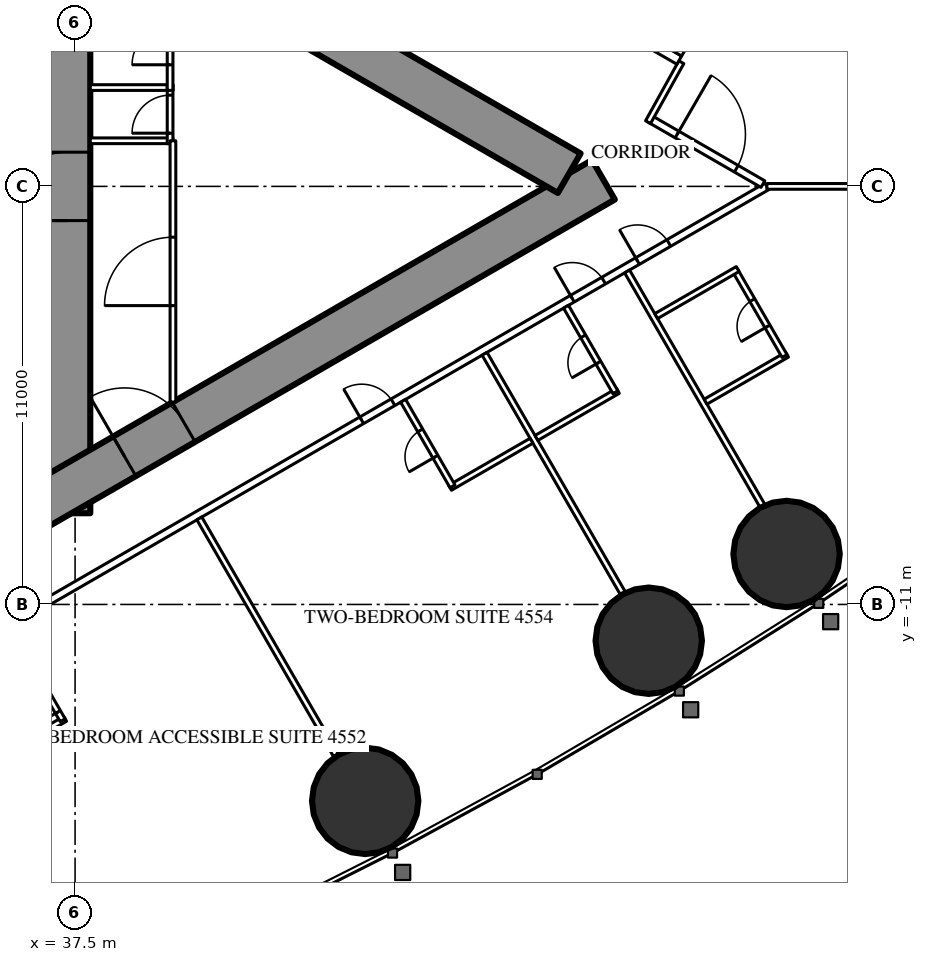
"""IFC4 building model, lengths in metres.
Left out: names, types, materials, properties, quantities, classifications, styles, units other than length and angle.
Written with IfcOpenShell. Run it as: python <this file> out.ifc"""

import sys

from ifc_helpers import new_model, si_unit, direction, frame, frame_2d, origin, origin_2d, place, context, subcontext, project, spatial, rectangle, circle, extrude, element, fill, save


model = new_model("IFC4")
c1 = context("Model", 3, precision=1e-05, world=origin(), true_north=direction((0.0, 1.0)))
c2 = subcontext(c1, "Body", "Model", "MODEL_VIEW")
j1 = project(units=[si_unit("LENGTHUNIT", "METRE"), si_unit("PLANEANGLEUNIT", "RADIAN")], contexts=[c1])
p1 = place(None, origin())
s1 = spatial("IfcSite", under=j1, at=p1, CompositionType="ELEMENT")
p2 = place(p1, origin())
s2 = spatial("IfcBuilding", under=s1, at=p2, CompositionType="ELEMENT")
p3 = place(p2, frame((0.0, 0.0, 170.3)))
s3 = spatial("IfcBuildingStorey", under=s2, at=p3, CompositionType="ELEMENT", Elevation=170.3)
for number, where, z_axis, x_axis in (
    (1, (45.134, -16.168, 0.0), (0.0, 0.0, 1.0), (1.0, 0.0, 0.0)),
    (2, (52.594, -11.955, 0.0), (0.0, 0.0, 1.0), (1.0, 0.0, 0.0)),
    (3, (56.221, -9.672, 0.0), (0.0, 0.0, 1.0), (1.0, 0.0, 0.0)),
):
    element("IfcColumn", number, at=place(p3, frame(where, z_axis=z_axis, x_axis=x_axis)), inside=s3, PredefinedType="COLUMN", context=c2, shape_type="SweptSolid", body=[
        extrude(circle(Radius=1.4, at=origin_2d()), origin(), (0.0, 0.0, 1.0), 3.5),
    ])
p4 = place(p3, frame((37.3, -8.6, 0.0), z_axis=(0.0, 0.0, 1.0), x_axis=(0.0, 1.0, 0.0)))
e4 = element("IfcWall", 4, at=p4, inside=s3, PredefinedType="SHEAR", context=c2, shape_type="SweptSolid", body=[
    extrude(rectangle(XDim=17.2, YDim=1.2, at=frame_2d((8.6, 0.0))), origin(), (0.0, 0.0, 1.0), 3.5),
])
p5 = place(p4, frame((7.7, 0.0, 0.0)))
e5 = element("IfcOpeningElement", 5, at=p5, cuts=e4, PredefinedType="OPENING", context=c2, shape_type="SweptSolid", body=[
    extrude(rectangle(XDim=1.8, YDim=2.2, at=frame_2d((0.9, 1.1))), frame((0.0, 0.61, 0.0), z_axis=(0.0, -1.0, 0.0), x_axis=(1.0, 0.0, 0.0)), (0.0, 0.0, 1.0), 1.22),
])
p6 = place(p3, frame((27.2, -13.8, 0.0), z_axis=(0.0, 0.0, 1.0), x_axis=(0.866027159892, 0.499996958321, 0.0)))
e6 = element("IfcWall", 6, at=p6, inside=s3, PredefinedType="SHEAR", context=c2, shape_type="SweptSolid", body=[
    extrude(rectangle(XDim=27.947, YDim=1.2, at=frame_2d((13.973, 0.0))), origin(), (0.0, 0.0, 1.0), 3.5),
])
p7 = place(p6, frame((4.6, 0.0, 0.0)))
e7 = element("IfcOpeningElement", 7, at=p7, cuts=e6, PredefinedType="OPENING", context=c2, shape_type="SweptSolid", body=[
    extrude(rectangle(XDim=1.0, YDim=2.2, at=frame_2d((0.5, 1.1))), frame((0.0, 0.61, 0.0), z_axis=(0.0, -1.0, 0.0), x_axis=(1.0, 0.0, 0.0)), (0.0, 0.0, 1.0), 1.22),
])
p8 = place(p6, frame((13.395, 0.0, 0.0)))
e8 = element("IfcOpeningElement", 8, at=p8, cuts=e6, PredefinedType="OPENING", context=c2, shape_type="SweptSolid", body=[
    extrude(rectangle(XDim=1.8, YDim=2.2, at=frame_2d((0.9, 1.1))), frame((0.0, 0.61, 0.0), z_axis=(0.0, -1.0, 0.0), x_axis=(1.0, 0.0, 0.0)), (0.0, 0.0, 1.0), 1.22),
])
p9 = place(p3, frame((27.2, 13.8, 0.0), z_axis=(0.0, 0.0, 1.0), x_axis=(0.866024515034, -0.500001539357, 0.0)))
e9 = element("IfcWall", 9, at=p9, inside=s3, PredefinedType="SHEAR", context=c2, shape_type="SweptSolid", body=[
    extrude(rectangle(XDim=26.907, YDim=1.2, at=frame_2d((13.454, 0.0))), origin(), (0.0, 0.0, 1.0), 3.5),
])
p10 = place(p9, frame((4.6, 0.0, 0.0)))
e10 = element("IfcOpeningElement", 10, at=p10, cuts=e9, PredefinedType="OPENING", context=c2, shape_type="SweptSolid", body=[
    extrude(rectangle(XDim=1.0, YDim=2.2, at=frame_2d((0.5, 1.1))), frame((0.0, 0.61, 0.0), z_axis=(0.0, -1.0, 0.0), x_axis=(1.0, 0.0, 0.0)), (0.0, 0.0, 1.0), 1.22),
])
p11 = place(p9, frame((13.395, 0.0, 0.0)))
e11 = element("IfcOpeningElement", 11, at=p11, cuts=e9, PredefinedType="OPENING", context=c2, shape_type="SweptSolid", body=[
    extrude(rectangle(XDim=1.8, YDim=2.2, at=frame_2d((0.9, 1.1))), frame((0.0, 0.61, 0.0), z_axis=(0.0, -1.0, 0.0), x_axis=(1.0, 0.0, 0.0)), (0.0, 0.0, 1.0), 1.22),
])
p12 = place(p3, frame((27.959, -16.017, 0.0), z_axis=(0.0, 0.0, 1.0), x_axis=(0.866024151371, 0.500002169237, 0.0)))
e12 = element("IfcWall", 12, at=p12, inside=s3, PredefinedType="PARTITIONING", context=c2, shape_type="SweptSolid", body=[
    extrude(rectangle(XDim=32.034, YDim=0.2, at=frame_2d((16.017, 0.0))), origin(), (0.0, 0.0, 1.0), 3.25),
])
p13 = place(p12, frame((4.765, 0.0, 0.0)))
e13 = element("IfcOpeningElement", 13, at=p13, cuts=e12, PredefinedType="OPENING", context=c2, shape_type="SweptSolid", body=[
    extrude(rectangle(XDim=0.95, YDim=2.2, at=frame_2d((0.475, 1.1))), frame((0.0, 0.11, 0.0), z_axis=(0.0, -1.0, 0.0), x_axis=(1.0, 0.0, 0.0)), (0.0, 0.0, 1.0), 0.22),
])
p14 = place(p12, frame((9.215, 0.0, 0.0)))
e14 = element("IfcOpeningElement", 14, at=p14, cuts=e12, PredefinedType="OPENING", context=c2, shape_type="SweptSolid", body=[
    extrude(rectangle(XDim=1.0, YDim=2.2, at=frame_2d((0.5, 1.1))), frame((0.0, 0.11, 0.0), z_axis=(0.0, -1.0, 0.0), x_axis=(1.0, 0.0, 0.0)), (0.0, 0.0, 1.0), 0.22),
])
p15 = place(p12, frame((19.725, 0.0, 0.0)))
e15 = element("IfcOpeningElement", 15, at=p15, cuts=e12, PredefinedType="OPENING", context=c2, shape_type="SweptSolid", body=[
    extrude(rectangle(XDim=0.95, YDim=2.2, at=frame_2d((0.475, 1.1))), frame((0.0, 0.11, 0.0), z_axis=(0.0, -1.0, 0.0), x_axis=(1.0, 0.0, 0.0)), (0.0, 0.0, 1.0), 0.22),
])
p16 = place(p12, frame((26.125, 0.0, 0.0)))
e16 = element("IfcOpeningElement", 16, at=p16, cuts=e12, PredefinedType="OPENING", context=c2, shape_type="SweptSolid", body=[
    extrude(rectangle(XDim=0.95, YDim=2.2, at=frame_2d((0.475, 1.1))), frame((0.0, 0.11, 0.0), z_axis=(0.0, -1.0, 0.0), x_axis=(1.0, 0.0, 0.0)), (0.0, 0.0, 1.0), 0.22),
])
p17 = place(p12, frame((28.106, 0.0, 0.0)))
e17 = element("IfcOpeningElement", 17, at=p17, cuts=e12, PredefinedType="OPENING", context=c2, shape_type="SweptSolid", body=[
    extrude(rectangle(XDim=0.95, YDim=2.2, at=frame_2d((0.475, 1.1))), frame((0.0, 0.11, 0.0), z_axis=(0.0, -1.0, 0.0), x_axis=(1.0, 0.0, 0.0)), (0.0, 0.0, 1.0), 0.22),
])
p18 = place(p3, frame((33.284, -13.059, 0.0), z_axis=(0.0, 0.0, 1.0), x_axis=(0.499985904184, -0.866033541855, 0.0)))
e18 = element("IfcWall", 18, at=p18, inside=s3, PredefinedType="PARTITIONING", context=c2, shape_type="SweptSolid", body=[
    extrude(rectangle(XDim=9.385, YDim=0.15, at=frame_2d((4.693, 0.0))), origin(), (0.0, 0.0, 1.0), 3.25),
])
p19 = place(p3, frame((40.769, -8.737, 0.0), z_axis=(0.0, 0.0, 1.0), x_axis=(0.500013115284, -0.866017831539, 0.0)))
e19 = element("IfcWall", 19, at=p19, inside=s3, PredefinedType="PARTITIONING", context=c2, shape_type="SweptSolid", body=[
    extrude(rectangle(XDim=7.198, YDim=0.15, at=frame_2d((3.599, 0.0))), origin(), (0.0, 0.0, 1.0), 2.3),
])
p20 = place(p3, frame((48.275, -4.404, 0.0), z_axis=(0.0, 0.0, 1.0), x_axis=(0.500006004368, -0.866021937133, 0.0)))
e20 = element("IfcWall", 20, at=p20, inside=s3, PredefinedType="PARTITIONING", context=c2, shape_type="SweptSolid", body=[
    extrude(rectangle(XDim=7.279, YDim=0.15, at=frame_2d((3.64, 0.0))), origin(), (0.0, 0.0, 1.0), 2.3),
])
p21 = place(p3, frame((52.025, -2.238, 0.0), z_axis=(0.0, 0.0, 1.0), x_axis=(0.499983785035, -0.866034765296, 0.0)))
e21 = element("IfcWall", 21, at=p21, inside=s3, PredefinedType="PARTITIONING", context=c2, shape_type="SweptSolid", body=[
    extrude(rectangle(XDim=7.116, YDim=0.15, at=frame_2d((3.558, 0.0))), origin(), (0.0, 0.0, 1.0), 2.3),
])
p22 = place(p3, frame((55.702, 0.0, 0.0), z_axis=(0.0, 0.0, 1.0), x_axis=(1.0, 0.0, 0.0)))
e22 = element("IfcWall", 22, at=p22, inside=s3, PredefinedType="PARTITIONING", context=c2, shape_type="SweptSolid", body=[
    extrude(rectangle(XDim=8.518, YDim=0.15, at=frame_2d((4.259, 0.0))), origin(), (0.0, 0.0, 1.0), 2.3),
])
p23 = place(p3, frame((52.639, 1.769, 0.0), z_axis=(0.0, 0.0, 1.0), x_axis=(0.866027340901, -0.4999966448, 0.0)))
e23 = element("IfcWall", 23, at=p23, inside=s3, PredefinedType="PARTITIONING", context=c2, shape_type="SweptSolid", body=[
    extrude(rectangle(XDim=3.417, YDim=0.2, at=frame_2d((1.708, 0.0))), origin(), (0.0, 0.0, 1.0), 3.25),
])
p24 = place(p23, frame((0.809, 0.0, 0.0)))
e24 = element("IfcOpeningElement", 24, at=p24, cuts=e23, PredefinedType="OPENING", context=c2, shape_type="SweptSolid", body=[
    extrude(rectangle(XDim=1.8, YDim=2.2, at=frame_2d((0.9, 1.1))), frame((0.0, 0.11, 0.0), z_axis=(0.0, -1.0, 0.0), x_axis=(1.0, 0.0, 0.0)), (0.0, 0.0, 1.0), 0.22),
])
p25 = place(p3, frame((52.576, 1.689, 0.0), z_axis=(0.0, 0.0, 1.0), x_axis=(0.485424724123, 0.874278466629, 0.0)))
e25 = element("IfcWall", 25, at=p25, inside=s3, PredefinedType="PARTITIONING", context=c2, shape_type="SweptSolid", body=[
    extrude(rectangle(XDim=1.805, YDim=0.15, at=frame_2d((0.903, 0.0))), origin(), (0.0, 0.0, 1.0), 3.25),
])
p26 = place(p3, frame((34.749, -15.446, 0.0), z_axis=(0.0, 0.0, 1.0), x_axis=(0.866018712932, 0.500011588718, 0.0)))
e26 = element("IfcWall", 26, at=p26, inside=s3, PredefinedType="PARTITIONING", context=c2, shape_type="SweptSolid", body=[
    extrude(rectangle(XDim=2.875, YDim=0.15, at=frame_2d((1.438, 0.0))), origin(), (0.0, 0.0, 1.0), 3.25),
])
p27 = place(p3, frame((35.773, -11.621, 0.0), z_axis=(0.0, 0.0, 1.0), x_axis=(0.49998411664, -0.866034573852, 0.0)))
e27 = element("IfcWall", 27, at=p27, inside=s3, PredefinedType="PARTITIONING", context=c2, shape_type="SweptSolid", body=[
    extrude(rectangle(XDim=2.8, YDim=0.15, at=frame_2d((1.4, 0.0))), origin(), (0.0, 0.0, 1.0), 3.25),
])
p28 = place(p27, frame((1.55, 0.0, 0.0)))
e28 = element("IfcOpeningElement", 28, at=p28, cuts=e27, PredefinedType="OPENING", context=c2, shape_type="SweptSolid", body=[
    extrude(rectangle(XDim=1.0, YDim=2.2, at=frame_2d((0.5, 1.1))), frame((0.0, 0.085, 0.0), z_axis=(0.0, -1.0, 0.0), x_axis=(1.0, 0.0, 0.0)), (0.0, 0.0, 1.0), 0.17),
])
p29 = place(p3, frame((47.366, -7.93, 0.0), z_axis=(0.0, 0.0, 1.0), x_axis=(0.866031185235, 0.4999899861, 0.0)))
e29 = element("IfcWall", 29, at=p29, inside=s3, PredefinedType="PARTITIONING", context=c2, shape_type="SweptSolid", body=[
    extrude(rectangle(XDim=2.475, YDim=0.15, at=frame_2d((1.238, 0.0))), origin(), (0.0, 0.0, 1.0), 3.25),
])
p30 = place(p3, frame((46.131, -5.641, 0.0), z_axis=(0.0, 0.0, 1.0), x_axis=(0.49997716683, -0.86603858612, 0.0)))
e30 = element("IfcWall", 30, at=p30, inside=s3, PredefinedType="PARTITIONING", context=c2, shape_type="SweptSolid", body=[
    extrude(rectangle(XDim=2.6, YDim=0.15, at=frame_2d((1.3, 0.0))), origin(), (0.0, 0.0, 1.0), 3.25),
])
p31 = place(p30, frame((0.9, 0.0, 0.0)))
e31 = element("IfcOpeningElement", 31, at=p31, cuts=e30, PredefinedType="OPENING", context=c2, shape_type="SweptSolid", body=[
    extrude(rectangle(XDim=0.8, YDim=2.2, at=frame_2d((0.4, 1.1))), frame((0.0, 0.085, 0.0), z_axis=(0.0, -1.0, 0.0), x_axis=(1.0, 0.0, 0.0)), (0.0, 0.0, 1.0), 0.17),
])
p32 = place(p3, frame((49.64, -6.618, 0.0), z_axis=(0.0, 0.0, 1.0), x_axis=(0.866006523861, 0.500032699561, 0.0)))
e32 = element("IfcWall", 32, at=p32, inside=s3, PredefinedType="PARTITIONING", context=c2, shape_type="SweptSolid", body=[
    extrude(rectangle(XDim=2.475, YDim=0.15, at=frame_2d((1.237, 0.0))), origin(), (0.0, 0.0, 1.0), 3.25),
])
p33 = place(p3, frame((50.418, -3.166, 0.0), z_axis=(0.0, 0.0, 1.0), x_axis=(0.499936506574, -0.866062058628, 0.0)))
e33 = element("IfcWall", 33, at=p33, inside=s3, PredefinedType="PARTITIONING", context=c2, shape_type="SweptSolid", body=[
    extrude(rectangle(XDim=2.6, YDim=0.15, at=frame_2d((1.3, 0.0))), origin(), (0.0, 0.0, 1.0), 3.25),
])
p34 = place(p33, frame((0.9, 0.0, 0.0)))
e34 = element("IfcOpeningElement", 34, at=p34, cuts=e33, PredefinedType="OPENING", context=c2, shape_type="SweptSolid", body=[
    extrude(rectangle(XDim=0.8, YDim=2.2, at=frame_2d((0.4, 1.1))), frame((0.0, 0.085, 0.0), z_axis=(0.0, -1.0, 0.0), x_axis=(1.0, 0.0, 0.0)), (0.0, 0.0, 1.0), 0.17),
])
p35 = place(p3, frame((54.09, -5.665, 0.0), z_axis=(0.0, 0.0, 1.0), x_axis=(0.866006523861, 0.500032699561, 0.0)))
e35 = element("IfcWall", 35, at=p35, inside=s3, PredefinedType="PARTITIONING", context=c2, shape_type="SweptSolid", body=[
    extrude(rectangle(XDim=2.475, YDim=0.15, at=frame_2d((1.237, 0.0))), origin(), (0.0, 0.0, 1.0), 3.25),
])
p36 = place(p3, frame((54.869, -2.213, 0.0), z_axis=(0.0, 0.0, 1.0), x_axis=(0.500047596559, -0.865997922154, 0.0)))
e36 = element("IfcWall", 36, at=p36, inside=s3, PredefinedType="PARTITIONING", context=c2, shape_type="SweptSolid", body=[
    extrude(rectangle(XDim=2.6, YDim=0.15, at=frame_2d((1.3, 0.0))), origin(), (0.0, 0.0, 1.0), 3.25),
])
p37 = place(p36, frame((0.9, 0.0, 0.0)))
e37 = element("IfcOpeningElement", 37, at=p37, cuts=e36, PredefinedType="OPENING", context=c2, shape_type="SweptSolid", body=[
    extrude(rectangle(XDim=0.8, YDim=2.2, at=frame_2d((0.4, 1.1))), frame((0.0, 0.085, 0.0), z_axis=(0.0, -1.0, 0.0), x_axis=(1.0, 0.0, 0.0)), (0.0, 0.0, 1.0), 0.17),
])
p38 = place(p3, frame((52.79, -3.413, 0.0), z_axis=(0.0, 0.0, 1.0), x_axis=(0.866006523861, 0.500032699561, 0.0)))
e38 = element("IfcWall", 38, at=p38, inside=s3, PredefinedType="PARTITIONING", context=c2, shape_type="SweptSolid", body=[
    extrude(rectangle(XDim=2.475, YDim=0.15, at=frame_2d((1.237, 0.0))), origin(), (0.0, 0.0, 1.0), 3.25),
])
for number, where, z_axis, x_axis in (
    (39, (37.9, 1.2, 0.0), (0.0, 0.0, 1.0), (1.0, 0.0, 0.0)),
    (40, (37.9, 2.6, 0.0), (0.0, 0.0, 1.0), (1.0, 0.0, 0.0)),
):
    element("IfcWall", number, at=place(p3, frame(where, z_axis=z_axis, x_axis=x_axis)), inside=s3, PredefinedType="PARTITIONING", context=c2, shape_type="SweptSolid", body=[
        extrude(rectangle(XDim=2.175, YDim=0.15, at=frame_2d((1.087, 0.0))), origin(), (0.0, 0.0, 1.0), 3.25),
    ])
p39 = place(p3, frame((40.0, 1.125, 0.0), z_axis=(0.0, 0.0, 1.0), x_axis=(0.0, 1.0, 0.0)))
e41 = element("IfcWall", 41, at=p39, inside=s3, PredefinedType="PARTITIONING", context=c2, shape_type="SweptSolid", body=[
    extrude(rectangle(XDim=1.55, YDim=0.15, at=frame_2d((0.775, 0.0))), origin(), (0.0, 0.0, 1.0), 3.25),
])
p40 = place(p39, frame((0.275, 0.0, 0.0)))
e42 = element("IfcOpeningElement", 42, at=p40, cuts=e41, PredefinedType="OPENING", context=c2, shape_type="SweptSolid", body=[
    extrude(rectangle(XDim=1.0, YDim=2.2, at=frame_2d((0.5, 1.1))), frame((0.0, 0.085, 0.0), z_axis=(0.0, -1.0, 0.0), x_axis=(1.0, 0.0, 0.0)), (0.0, 0.0, 1.0), 0.17),
])
p41 = place(p3, frame((40.0, 2.525, 0.0), z_axis=(0.0, 0.0, 1.0), x_axis=(0.0, 1.0, 0.0)))
e43 = element("IfcWall", 43, at=p41, inside=s3, PredefinedType="PARTITIONING", context=c2, shape_type="SweptSolid", body=[
    extrude(rectangle(XDim=2.35, YDim=0.15, at=frame_2d((1.175, 0.0))), origin(), (0.0, 0.0, 1.0), 3.25),
])
p42 = place(p41, frame((0.675, 0.0, 0.0)))
e44 = element("IfcOpeningElement", 44, at=p42, cuts=e43, PredefinedType="OPENING", context=c2, shape_type="SweptSolid", body=[
    extrude(rectangle(XDim=1.0, YDim=2.2, at=frame_2d((0.5, 1.1))), frame((0.0, 0.085, 0.0), z_axis=(0.0, -1.0, 0.0), x_axis=(1.0, 0.0, 0.0)), (0.0, 0.0, 1.0), 0.17),
])
p43 = place(p3, frame((40.075, -5.674, 0.0), z_axis=(0.0, 0.0, 1.0), x_axis=(0.0, 1.0, 0.0)))
e45 = element("IfcWall", 45, at=p43, inside=s3, PredefinedType="PARTITIONING", context=c2, shape_type="SweptSolid", body=[
    extrude(rectangle(XDim=6.874, YDim=0.15, at=frame_2d((3.437, 0.0))), origin(), (0.0, 0.0, 1.0), 3.25),
])
p44 = place(p43, frame((2.537, 0.0, 0.0)))
e46 = element("IfcOpeningElement", 46, at=p44, cuts=e45, PredefinedType="OPENING", context=c2, shape_type="SweptSolid", body=[
    extrude(rectangle(XDim=1.8, YDim=2.2, at=frame_2d((0.9, 1.1))), frame((0.0, 0.085, 0.0), z_axis=(0.0, -1.0, 0.0), x_axis=(1.0, 0.0, 0.0)), (0.0, 0.0, 1.0), 0.17),
])
p45 = place(p3, frame((47.681, 6.622, 0.0), z_axis=(0.0, 0.0, 1.0), x_axis=(0.86603344179, -0.499986077507, 0.0)))
e47 = element("IfcWall", 47, at=p45, inside=s3, PredefinedType="PARTITIONING", context=c2, shape_type="SweptSolid", body=[
    extrude(rectangle(XDim=6.6, YDim=0.25, at=frame_2d((3.3, 0.0))), origin(), (0.0, 0.0, 1.0), 3.25),
])
p46 = place(p45, frame((0.75, 0.0, 0.0)))
e48 = element("IfcOpeningElement", 48, at=p46, cuts=e47, PredefinedType="OPENING", context=c2, shape_type="SweptSolid", body=[
    extrude(rectangle(XDim=1.1, YDim=2.2, at=frame_2d((0.55, 1.1))), frame((0.0, 0.135, 0.0), z_axis=(0.0, -1.0, 0.0), x_axis=(1.0, 0.0, 0.0)), (0.0, 0.0, 1.0), 0.27),
])
p47 = place(p45, frame((2.75, 0.0, 0.0)))
e49 = element("IfcOpeningElement", 49, at=p47, cuts=e47, PredefinedType="OPENING", context=c2, shape_type="SweptSolid", body=[
    extrude(rectangle(XDim=1.1, YDim=2.2, at=frame_2d((0.55, 1.1))), frame((0.0, 0.135, 0.0), z_axis=(0.0, -1.0, 0.0), x_axis=(1.0, 0.0, 0.0)), (0.0, 0.0, 1.0), 0.27),
])
p48 = place(p45, frame((4.75, 0.0, 0.0)))
e50 = element("IfcOpeningElement", 50, at=p48, cuts=e47, PredefinedType="OPENING", context=c2, shape_type="SweptSolid", body=[
    extrude(rectangle(XDim=1.1, YDim=2.2, at=frame_2d((0.55, 1.1))), frame((0.0, 0.135, 0.0), z_axis=(0.0, -1.0, 0.0), x_axis=(1.0, 0.0, 0.0)), (0.0, 0.0, 1.0), 0.27),
])
p49 = place(p3, frame((53.352, 3.493, 0.0), z_axis=(0.0, 0.0, 1.0), x_axis=(0.499872130319, 0.866099216793, 0.0)))
e51 = element("IfcWall", 51, at=p49, inside=s3, PredefinedType="PARTITIONING", context=c2, shape_type="SweptSolid", body=[
    extrude(rectangle(XDim=3.2, YDim=0.25, at=frame_2d((1.6, 0.0))), origin(), (0.0, 0.0, 1.0), 3.25),
])
p50 = place(p28, origin())
e52 = element("IfcDoor", 52, at=p50, inside=s3, OperationType="SINGLE_SWING_RIGHT", PredefinedType="DOOR", context=c2, shape_type="SweptSolid", body=[
    extrude(rectangle(XDim=1.0, YDim=2.2, at=frame_2d((0.5, 1.1))), frame((0.0, 0.025, 0.0), z_axis=(0.0, -1.0, 0.0), x_axis=(1.0, 0.0, 0.0)), (0.0, 0.0, 1.0), 0.05),
])
fill(e28, e52)
p51 = place(p31, origin())
e53 = element("IfcDoor", 53, at=p51, inside=s3, OperationType="SINGLE_SWING_RIGHT", PredefinedType="DOOR", context=c2, shape_type="SweptSolid", body=[
    extrude(rectangle(XDim=0.8, YDim=2.2, at=frame_2d((0.4, 1.1))), frame((0.0, 0.025, 0.0), z_axis=(0.0, -1.0, 0.0), x_axis=(1.0, 0.0, 0.0)), (0.0, 0.0, 1.0), 0.05),
])
fill(e31, e53)
p52 = place(p15, origin())
e54 = element("IfcDoor", 54, at=p52, inside=s3, OperationType="SINGLE_SWING_LEFT", PredefinedType="DOOR", context=c2, shape_type="SweptSolid", body=[
    extrude(rectangle(XDim=0.95, YDim=2.2, at=frame_2d((0.475, 1.1))), frame((0.0, 0.025, 0.0), z_axis=(0.0, -1.0, 0.0), x_axis=(1.0, 0.0, 0.0)), (0.0, 0.0, 1.0), 0.05),
])
fill(e15, e54)
p53 = place(p34, origin())
e55 = element("IfcDoor", 55, at=p53, inside=s3, OperationType="SINGLE_SWING_RIGHT", PredefinedType="DOOR", context=c2, shape_type="SweptSolid", body=[
    extrude(rectangle(XDim=0.8, YDim=2.2, at=frame_2d((0.4, 1.1))), frame((0.0, 0.025, 0.0), z_axis=(0.0, -1.0, 0.0), x_axis=(1.0, 0.0, 0.0)), (0.0, 0.0, 1.0), 0.05),
])
fill(e34, e55)
p54 = place(p16, origin())
e56 = element("IfcDoor", 56, at=p54, inside=s3, OperationType="SINGLE_SWING_LEFT", PredefinedType="DOOR", context=c2, shape_type="SweptSolid", body=[
    extrude(rectangle(XDim=0.95, YDim=2.2, at=frame_2d((0.475, 1.1))), frame((0.0, 0.025, 0.0), z_axis=(0.0, -1.0, 0.0), x_axis=(1.0, 0.0, 0.0)), (0.0, 0.0, 1.0), 0.05),
])
fill(e16, e56)
p55 = place(p37, origin())
e57 = element("IfcDoor", 57, at=p55, inside=s3, OperationType="SINGLE_SWING_RIGHT", PredefinedType="DOOR", context=c2, shape_type="SweptSolid", body=[
    extrude(rectangle(XDim=0.8, YDim=2.2, at=frame_2d((0.4, 1.1))), frame((0.0, 0.025, 0.0), z_axis=(0.0, -1.0, 0.0), x_axis=(1.0, 0.0, 0.0)), (0.0, 0.0, 1.0), 0.05),
])
fill(e37, e57)
p56 = place(p17, origin())
e58 = element("IfcDoor", 58, at=p56, inside=s3, OperationType="SINGLE_SWING_LEFT", PredefinedType="DOOR", context=c2, shape_type="SweptSolid", body=[
    extrude(rectangle(XDim=0.95, YDim=2.2, at=frame_2d((0.475, 1.1))), frame((0.0, 0.025, 0.0), z_axis=(0.0, -1.0, 0.0), x_axis=(1.0, 0.0, 0.0)), (0.0, 0.0, 1.0), 0.05),
])
fill(e17, e58)
p57 = place(p24, origin())
e59 = element("IfcDoor", 59, at=p57, inside=s3, OperationType="DOUBLE_DOOR_SINGLE_SWING", PredefinedType="DOOR", context=c2, shape_type="SweptSolid", body=[
    extrude(rectangle(XDim=1.8, YDim=2.2, at=frame_2d((0.9, 1.1))), frame((0.0, 0.025, 0.0), z_axis=(0.0, -1.0, 0.0), x_axis=(1.0, 0.0, 0.0)), (0.0, 0.0, 1.0), 0.05),
])
fill(e24, e59)
p58 = place(p40, origin())
e60 = element("IfcDoor", 60, at=p58, inside=s3, OperationType="SINGLE_SWING_LEFT", PredefinedType="DOOR", context=c2, shape_type="SweptSolid", body=[
    extrude(rectangle(XDim=1.0, YDim=2.2, at=frame_2d((0.5, 1.1))), frame((0.0, 0.025, 0.0), z_axis=(0.0, -1.0, 0.0), x_axis=(1.0, 0.0, 0.0)), (0.0, 0.0, 1.0), 0.05),
])
fill(e42, e60)
p59 = place(p42, origin())
e61 = element("IfcDoor", 61, at=p59, inside=s3, OperationType="SINGLE_SWING_LEFT", PredefinedType="DOOR", context=c2, shape_type="SweptSolid", body=[
    extrude(rectangle(XDim=1.0, YDim=2.2, at=frame_2d((0.5, 1.1))), frame((0.0, 0.025, 0.0), z_axis=(0.0, -1.0, 0.0), x_axis=(1.0, 0.0, 0.0)), (0.0, 0.0, 1.0), 0.05),
])
fill(e44, e61)
p60 = place(p44, origin())
e62 = element("IfcDoor", 62, at=p60, inside=s3, OperationType="DOUBLE_DOOR_SINGLE_SWING", PredefinedType="DOOR", context=c2, shape_type="SweptSolid", body=[
    extrude(rectangle(XDim=1.8, YDim=2.2, at=frame_2d((0.9, 1.1))), frame((0.0, 0.025, 0.0), z_axis=(0.0, -1.0, 0.0), x_axis=(1.0, 0.0, 0.0)), (0.0, 0.0, 1.0), 0.05),
])
fill(e46, e62)
p61 = place(p8, origin())
e63 = element("IfcDoor", 63, at=p61, inside=s3, OperationType="DOUBLE_DOOR_SINGLE_SWING", PredefinedType="DOOR", context=c2, shape_type="SweptSolid", body=[
    extrude(rectangle(XDim=1.8, YDim=2.2, at=frame_2d((0.9, 1.1))), frame((0.0, 0.025, 0.0), z_axis=(0.0, -1.0, 0.0), x_axis=(1.0, 0.0, 0.0)), (0.0, 0.0, 1.0), 0.05),
])
fill(e8, e63)
p62 = place(p5, origin())
e64 = element("IfcDoor", 64, at=p62, inside=s3, OperationType="DOUBLE_DOOR_SINGLE_SWING", PredefinedType="DOOR", context=c2, shape_type="SweptSolid", body=[
    extrude(rectangle(XDim=1.8, YDim=2.2, at=frame_2d((0.9, 1.1))), frame((0.0, 0.025, 0.0), z_axis=(0.0, -1.0, 0.0), x_axis=(1.0, 0.0, 0.0)), (0.0, 0.0, 1.0), 0.05),
])
fill(e5, e64)
save(model, sys.argv[1])
